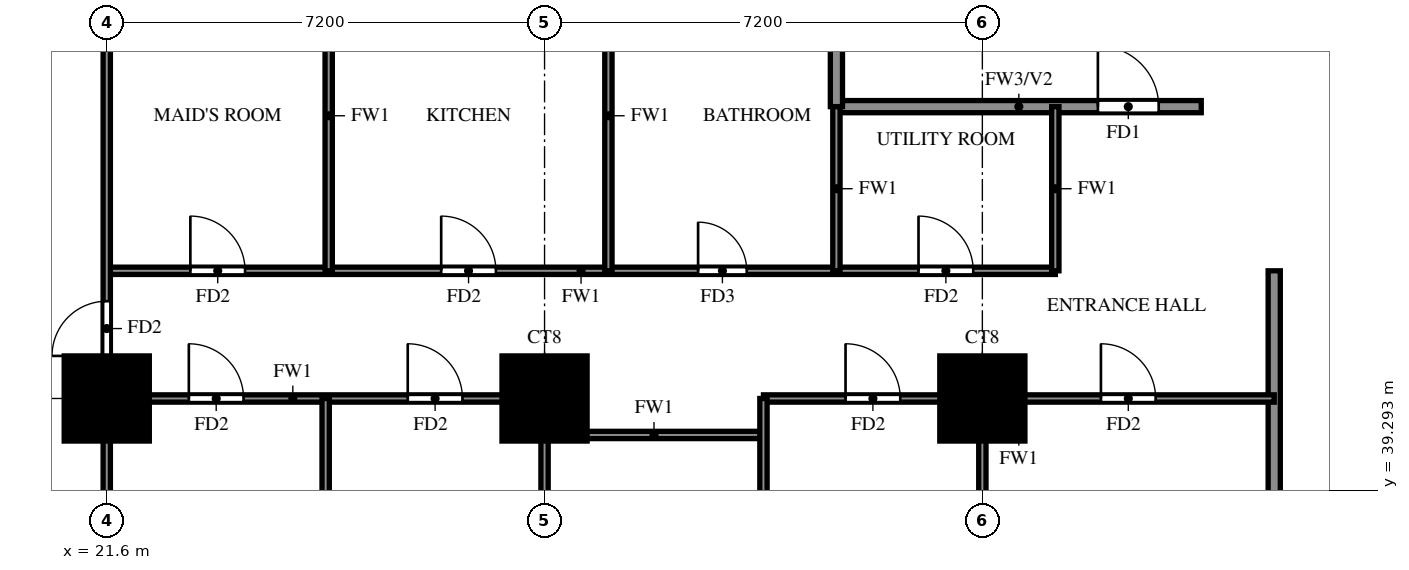
"""IFC4 building model, lengths in metres.
Left out: names, types, materials, properties, quantities, classifications, styles, units other than length and angle.
Written with IfcOpenShell. Run it as: python <this file> out.ifc"""

import sys

from ifc_helpers import new_model, si_unit, direction, frame, frame_2d, origin, origin_2d, place, context, subcontext, project, spatial, rectangle, extrude, source, transform, mapped, element, fill, save


model = new_model("IFC4")
c1 = context("Model", 3, precision=1e-05, world=origin(), true_north=direction((0.0, 1.0)))
c2 = subcontext(c1, "Body", "Model", "MODEL_VIEW")
j1 = project(units=[si_unit("LENGTHUNIT", "METRE"), si_unit("PLANEANGLEUNIT", "RADIAN")], contexts=[c1])
p1 = place(None, origin())
s1 = spatial("IfcSite", under=j1, at=p1, CompositionType="ELEMENT")
p2 = place(p1, origin())
s2 = spatial("IfcBuilding", under=s1, at=p2, CompositionType="ELEMENT")
p3 = place(p2, frame((0.0, 0.0, 30.5)))
s3 = spatial("IfcBuildingStorey", under=s2, at=p3, CompositionType="ELEMENT", Elevation=30.5)
m1 = source(origin(), c2, "Body", "SweptSolid", [
    extrude(rectangle(XDim=1.4, YDim=1.4, at=origin_2d()), origin(), (0.0, 0.0, 1.0), 3.18),
])
for number, where, z_axis, x_axis in (
    (1, (21.6, 40.8, 0.0), (0.0, 0.0, 1.0), (1.0, 0.0, 0.0)),
    (2, (28.8, 40.8, 0.0), (0.0, 0.0, 1.0), (1.0, 0.0, 0.0)),
    (3, (36.0, 40.8, 0.0), (0.0, 0.0, 1.0), (1.0, 0.0, 0.0)),
):
    element("IfcColumn", number, at=place(p3, frame(where, z_axis=z_axis, x_axis=x_axis)), inside=s3, PredefinedType="COLUMN", context=c2, shape_type="MappedRepresentation", body=[
        mapped(m1, transform((0.0, 0.0, 0.0))),
    ])
p4 = place(p3, frame((33.6, 45.6, 0.0), z_axis=(0.0, 0.0, 1.0), x_axis=(1.0, 0.0, 0.0)))
e4 = element("IfcWall", 4, at=p4, inside=s3, PredefinedType="SOLIDWALL", context=c2, shape_type="SweptSolid", body=[
    extrude(rectangle(XDim=6.0, YDim=0.2, at=frame_2d((3.0, 0.0))), origin(), (0.0, 0.0, 1.0), 3.18),
])
p5 = place(p4, frame((4.3, 0.0, 0.0)))
e5 = element("IfcOpeningElement", 5, at=p5, cuts=e4, PredefinedType="OPENING", context=c2, shape_type="SweptSolid", body=[
    extrude(rectangle(XDim=1.0, YDim=2.1, at=frame_2d((0.5, 1.05))), frame((0.0, 0.11, 0.0), z_axis=(0.0, -1.0, 0.0), x_axis=(1.0, 0.0, 0.0)), (0.0, 0.0, 1.0), 0.22),
])
p6 = place(p3, frame((33.6, 45.6, 0.0), z_axis=(0.0, 0.0, 1.0), x_axis=(0.0, 1.0, 0.0)))
e6 = element("IfcWall", 6, at=p6, inside=s3, PredefinedType="SOLIDWALL", context=c2, shape_type="SweptSolid", body=[
    extrude(rectangle(XDim=14.4, YDim=0.2, at=frame_2d((7.2, 0.0))), origin(), (0.0, 0.0, 1.0), 3.18),
])
p7 = place(p3, frame((40.8, 33.725, 0.0), z_axis=(0.0, 0.0, 1.0), x_axis=(0.0, 1.0, 0.0)))
e7 = element("IfcWall", 7, at=p7, inside=s3, PredefinedType="SOLIDWALL", context=c2, shape_type="SweptSolid", body=[
    extrude(rectangle(XDim=9.175, YDim=0.2, at=frame_2d((4.587, 0.0))), origin(), (0.0, 0.0, 1.0), 2.28),
])
p8 = place(p3, frame((28.8, 40.2, 0.0), z_axis=(0.0, 0.0, 1.0), x_axis=(1.0, 0.0, 0.0)))
e8 = element("IfcWall", 8, at=p8, inside=s3, PredefinedType="PARTITIONING", context=c2, shape_type="SweptSolid", body=[
    extrude(rectangle(XDim=3.6, YDim=0.12, at=frame_2d((1.8, 0.0))), origin(), (0.0, 0.0, 1.0), 3.18),
])
p9 = place(p3, frame((21.6, 40.8, 0.0), z_axis=(0.0, 0.0, 1.0), x_axis=(1.0, 0.0, 0.0)))
e9 = element("IfcWall", 9, at=p9, inside=s3, PredefinedType="PARTITIONING", context=c2, shape_type="SweptSolid", body=[
    extrude(rectangle(XDim=7.2, YDim=0.12, at=frame_2d((3.6, 0.0))), origin(), (0.0, 0.0, 1.0), 3.18),
])
p10 = place(p9, frame((1.35, 0.0, 0.0)))
e10 = element("IfcOpeningElement", 10, at=p10, cuts=e9, PredefinedType="OPENING", context=c2, shape_type="SweptSolid", body=[
    extrude(rectangle(XDim=0.9, YDim=2.1, at=frame_2d((0.45, 1.05))), frame((0.0, 0.07, 0.0), z_axis=(0.0, -1.0, 0.0), x_axis=(1.0, 0.0, 0.0)), (0.0, 0.0, 1.0), 0.14),
])
p11 = place(p9, frame((4.95, 0.0, 0.0)))
e11 = element("IfcOpeningElement", 11, at=p11, cuts=e9, PredefinedType="OPENING", context=c2, shape_type="SweptSolid", body=[
    extrude(rectangle(XDim=0.9, YDim=2.1, at=frame_2d((0.45, 1.05))), frame((0.0, 0.07, 0.0), z_axis=(0.0, -1.0, 0.0), x_axis=(1.0, 0.0, 0.0)), (0.0, 0.0, 1.0), 0.14),
])
p12 = place(p3, frame((32.4, 40.8, 0.0), z_axis=(0.0, 0.0, 1.0), x_axis=(1.0, 0.0, 0.0)))
e12 = element("IfcWall", 12, at=p12, inside=s3, PredefinedType="PARTITIONING", context=c2, shape_type="SweptSolid", body=[
    extrude(rectangle(XDim=8.4, YDim=0.12, at=frame_2d((4.2, 0.0))), origin(), (0.0, 0.0, 1.0), 3.18),
])
p13 = place(p12, frame((1.35, 0.0, 0.0)))
e13 = element("IfcOpeningElement", 13, at=p13, cuts=e12, PredefinedType="OPENING", context=c2, shape_type="SweptSolid", body=[
    extrude(rectangle(XDim=0.9, YDim=2.1, at=frame_2d((0.45, 1.05))), frame((0.0, 0.07, 0.0), z_axis=(0.0, -1.0, 0.0), x_axis=(1.0, 0.0, 0.0)), (0.0, 0.0, 1.0), 0.14),
])
p14 = place(p12, frame((5.55, 0.0, 0.0)))
e14 = element("IfcOpeningElement", 14, at=p14, cuts=e12, PredefinedType="OPENING", context=c2, shape_type="SweptSolid", body=[
    extrude(rectangle(XDim=0.9, YDim=2.1, at=frame_2d((0.45, 1.05))), frame((0.0, 0.07, 0.0), z_axis=(0.0, -1.0, 0.0), x_axis=(1.0, 0.0, 0.0)), (0.0, 0.0, 1.0), 0.14),
])
p15 = place(p3, frame((21.6, 42.9, 0.0), z_axis=(0.0, 0.0, 1.0), x_axis=(1.0, 0.0, 0.0)))
e15 = element("IfcWall", 15, at=p15, inside=s3, PredefinedType="PARTITIONING", context=c2, shape_type="SweptSolid", body=[
    extrude(rectangle(XDim=15.6, YDim=0.12, at=frame_2d((7.8, 0.0))), origin(), (0.0, 0.0, 1.0), 3.18),
])
p16 = place(p15, frame((1.375, 0.0, 0.0)))
e16 = element("IfcOpeningElement", 16, at=p16, cuts=e15, PredefinedType="OPENING", context=c2, shape_type="SweptSolid", body=[
    extrude(rectangle(XDim=0.9, YDim=2.1, at=frame_2d((0.45, 1.05))), frame((0.0, 0.07, 0.0), z_axis=(0.0, -1.0, 0.0), x_axis=(1.0, 0.0, 0.0)), (0.0, 0.0, 1.0), 0.14),
])
p17 = place(p15, frame((5.5, 0.0, 0.0)))
e17 = element("IfcOpeningElement", 17, at=p17, cuts=e15, PredefinedType="OPENING", context=c2, shape_type="SweptSolid", body=[
    extrude(rectangle(XDim=0.9, YDim=2.1, at=frame_2d((0.45, 1.05))), frame((0.0, 0.07, 0.0), z_axis=(0.0, -1.0, 0.0), x_axis=(1.0, 0.0, 0.0)), (0.0, 0.0, 1.0), 0.14),
])
p18 = place(p15, frame((9.725, 0.0, 0.0)))
e18 = element("IfcOpeningElement", 18, at=p18, cuts=e15, PredefinedType="OPENING", context=c2, shape_type="SweptSolid", body=[
    extrude(rectangle(XDim=0.8, YDim=2.1, at=frame_2d((0.4, 1.05))), frame((0.0, 0.07, 0.0), z_axis=(0.0, -1.0, 0.0), x_axis=(1.0, 0.0, 0.0)), (0.0, 0.0, 1.0), 0.14),
])
p19 = place(p15, frame((13.35, 0.0, 0.0)))
e19 = element("IfcOpeningElement", 19, at=p19, cuts=e15, PredefinedType="OPENING", context=c2, shape_type="SweptSolid", body=[
    extrude(rectangle(XDim=0.9, YDim=2.1, at=frame_2d((0.45, 1.05))), frame((0.0, 0.07, 0.0), z_axis=(0.0, -1.0, 0.0), x_axis=(1.0, 0.0, 0.0)), (0.0, 0.0, 1.0), 0.14),
])
p20 = place(p3, frame((21.6, 33.725, 0.0), z_axis=(0.0, 0.0, 1.0), x_axis=(0.0, 1.0, 0.0)))
e20 = element("IfcWall", 20, at=p20, inside=s3, PredefinedType="PARTITIONING", context=c2, shape_type="SweptSolid", body=[
    extrude(rectangle(XDim=35.875, YDim=0.12, at=frame_2d((17.938, 0.0))), origin(), (0.0, 0.0, 1.0), 3.18),
])
p21 = place(p20, frame((7.775, 0.0, 0.0)))
e21 = element("IfcOpeningElement", 21, at=p21, cuts=e20, PredefinedType="OPENING", context=c2, shape_type="SweptSolid", body=[
    extrude(rectangle(XDim=0.9, YDim=2.1, at=frame_2d((0.45, 1.05))), frame((0.0, 0.07, 0.0), z_axis=(0.0, -1.0, 0.0), x_axis=(1.0, 0.0, 0.0)), (0.0, 0.0, 1.0), 0.14),
])
p22 = place(p20, frame((15.625, 0.0, 0.0)))
e22 = element("IfcOpeningElement", 22, at=p22, cuts=e20, PredefinedType="OPENING", context=c2, shape_type="SweptSolid", body=[
    extrude(rectangle(XDim=0.9, YDim=2.1, at=frame_2d((0.45, 1.05))), frame((0.0, 0.07, 0.0), z_axis=(0.0, -1.0, 0.0), x_axis=(1.0, 0.0, 0.0)), (0.0, 0.0, 1.0), 0.14),
])
p23 = place(p20, frame((22.225, 0.0, 0.0)))
e23 = element("IfcOpeningElement", 23, at=p23, cuts=e20, PredefinedType="OPENING", context=c2, shape_type="SweptSolid", body=[
    extrude(rectangle(XDim=1.5, YDim=2.1, at=frame_2d((0.75, 1.05))), frame((0.0, 0.07, 0.0), z_axis=(0.0, -1.0, 0.0), x_axis=(1.0, 0.0, 0.0)), (0.0, 0.0, 1.0), 0.14),
])
p24 = place(p20, frame((26.425, 0.0, 0.0)))
e24 = element("IfcOpeningElement", 24, at=p24, cuts=e20, PredefinedType="OPENING", context=c2, shape_type="SweptSolid", body=[
    extrude(rectangle(XDim=0.9, YDim=2.1, at=frame_2d((0.45, 1.05))), frame((0.0, 0.07, 0.0), z_axis=(0.0, -1.0, 0.0), x_axis=(1.0, 0.0, 0.0)), (0.0, 0.0, 1.0), 0.14),
])
p25 = place(p20, frame((30.025, 0.0, 0.0)))
e25 = element("IfcOpeningElement", 25, at=p25, cuts=e20, PredefinedType="OPENING", context=c2, shape_type="SweptSolid", body=[
    extrude(rectangle(XDim=0.9, YDim=2.1, at=frame_2d((0.45, 1.05))), frame((0.0, 0.07, 0.0), z_axis=(0.0, -1.0, 0.0), x_axis=(1.0, 0.0, 0.0)), (0.0, 0.0, 1.0), 0.14),
])
p26 = place(p20, frame((33.625, 0.0, 0.0)))
e26 = element("IfcOpeningElement", 26, at=p26, cuts=e20, PredefinedType="OPENING", context=c2, shape_type="SweptSolid", body=[
    extrude(rectangle(XDim=0.9, YDim=2.1, at=frame_2d((0.45, 1.05))), frame((0.0, 0.07, 0.0), z_axis=(0.0, -1.0, 0.0), x_axis=(1.0, 0.0, 0.0)), (0.0, 0.0, 1.0), 0.14),
])
p27 = place(p3, frame((25.2, 33.725, 0.0), z_axis=(0.0, 0.0, 1.0), x_axis=(0.0, 1.0, 0.0)))
e27 = element("IfcWall", 27, at=p27, inside=s3, PredefinedType="PARTITIONING", context=c2, shape_type="SweptSolid", body=[
    extrude(rectangle(XDim=7.075, YDim=0.12, at=frame_2d((3.538, 0.0))), origin(), (0.0, 0.0, 1.0), 2.28),
])
p28 = place(p3, frame((25.25, 42.9, 0.0), z_axis=(0.0, 0.0, 1.0), x_axis=(0.0, 1.0, 0.0)))
e28 = element("IfcWall", 28, at=p28, inside=s3, PredefinedType="PARTITIONING", context=c2, shape_type="SweptSolid", body=[
    extrude(rectangle(XDim=5.1, YDim=0.12, at=frame_2d((2.55, 0.0))), origin(), (0.0, 0.0, 1.0), 3.18),
])
p29 = place(p3, frame((28.8, 33.725, 0.0), z_axis=(0.0, 0.0, 1.0), x_axis=(0.0, 1.0, 0.0)))
e29 = element("IfcWall", 29, at=p29, inside=s3, PredefinedType="PARTITIONING", context=c2, shape_type="SweptSolid", body=[
    extrude(rectangle(XDim=7.075, YDim=0.12, at=frame_2d((3.538, 0.0))), origin(), (0.0, 0.0, 1.0), 3.18),
])
p30 = place(p29, frame((2.837, 0.0, 0.0)))
e30 = element("IfcOpeningElement", 30, at=p30, cuts=e29, PredefinedType="OPENING", context=c2, shape_type="SweptSolid", body=[
    extrude(rectangle(XDim=0.8, YDim=2.1, at=frame_2d((0.4, 1.05))), frame((0.0, 0.07, 0.0), z_axis=(0.0, -1.0, 0.0), x_axis=(1.0, 0.0, 0.0)), (0.0, 0.0, 1.0), 0.14),
])
p31 = place(p3, frame((29.85, 42.9, 0.0), z_axis=(0.0, 0.0, 1.0), x_axis=(0.0, 1.0, 0.0)))
e31 = element("IfcWall", 31, at=p31, inside=s3, PredefinedType="PARTITIONING", context=c2, shape_type="SweptSolid", body=[
    extrude(rectangle(XDim=5.1, YDim=0.12, at=frame_2d((2.55, 0.0))), origin(), (0.0, 0.0, 1.0), 3.18),
])
p32 = place(p3, frame((32.4, 33.725, 0.0), z_axis=(0.0, 0.0, 1.0), x_axis=(0.0, 1.0, 0.0)))
e32 = element("IfcWall", 32, at=p32, inside=s3, PredefinedType="PARTITIONING", context=c2, shape_type="SweptSolid", body=[
    extrude(rectangle(XDim=7.075, YDim=0.12, at=frame_2d((3.538, 0.0))), origin(), (0.0, 0.0, 1.0), 2.28),
])
p33 = place(p3, frame((33.6, 42.9, 0.0), z_axis=(0.0, 0.0, 1.0), x_axis=(0.0, 1.0, 0.0)))
e33 = element("IfcWall", 33, at=p33, inside=s3, PredefinedType="PARTITIONING", context=c2, shape_type="SweptSolid", body=[
    extrude(rectangle(XDim=2.7, YDim=0.12, at=frame_2d((1.35, 0.0))), origin(), (0.0, 0.0, 1.0), 3.18),
])
p34 = place(p3, frame((36.0, 33.725, 0.0), z_axis=(0.0, 0.0, 1.0), x_axis=(0.0, 1.0, 0.0)))
e34 = element("IfcWall", 34, at=p34, inside=s3, PredefinedType="PARTITIONING", context=c2, shape_type="SweptSolid", body=[
    extrude(rectangle(XDim=7.075, YDim=0.12, at=frame_2d((3.538, 0.0))), origin(), (0.0, 0.0, 1.0), 3.18),
])
p35 = place(p3, frame((37.2, 42.9, 0.0), z_axis=(0.0, 0.0, 1.0), x_axis=(0.0, 1.0, 0.0)))
e35 = element("IfcWall", 35, at=p35, inside=s3, PredefinedType="PARTITIONING", context=c2, shape_type="SweptSolid", body=[
    extrude(rectangle(XDim=2.7, YDim=0.12, at=frame_2d((1.35, 0.0))), origin(), (0.0, 0.0, 1.0), 3.18),
])
p36 = place(p5, origin())
e36 = element("IfcDoor", 36, at=p36, inside=s3, OperationType="SINGLE_SWING_RIGHT", PredefinedType="DOOR", context=c2, shape_type="SweptSolid", body=[
    extrude(rectangle(XDim=1.0, YDim=2.1, at=frame_2d((0.5, 1.05))), frame((0.0, 0.025, 0.0), z_axis=(0.0, -1.0, 0.0), x_axis=(1.0, 0.0, 0.0)), (0.0, 0.0, 1.0), 0.05),
])
fill(e5, e36)
p37 = place(p21, origin())
e37 = element("IfcDoor", 37, at=p37, inside=s3, OperationType="SINGLE_SWING_RIGHT", PredefinedType="DOOR", context=c2, shape_type="SweptSolid", body=[
    extrude(rectangle(XDim=0.9, YDim=2.1, at=frame_2d((0.45, 1.05))), frame((0.0, 0.025, 0.0), z_axis=(0.0, -1.0, 0.0), x_axis=(1.0, 0.0, 0.0)), (0.0, 0.0, 1.0), 0.05),
])
fill(e21, e37)
p38 = place(p10, origin())
e38 = element("IfcDoor", 38, at=p38, inside=s3, OperationType="SINGLE_SWING_LEFT", PredefinedType="DOOR", context=c2, shape_type="SweptSolid", body=[
    extrude(rectangle(XDim=0.9, YDim=2.1, at=frame_2d((0.45, 1.05))), frame((0.0, 0.025, 0.0), z_axis=(0.0, -1.0, 0.0), x_axis=(1.0, 0.0, 0.0)), (0.0, 0.0, 1.0), 0.05),
])
fill(e10, e38)
p39 = place(p11, origin())
e39 = element("IfcDoor", 39, at=p39, inside=s3, OperationType="SINGLE_SWING_RIGHT", PredefinedType="DOOR", context=c2, shape_type="SweptSolid", body=[
    extrude(rectangle(XDim=0.9, YDim=2.1, at=frame_2d((0.45, 1.05))), frame((0.0, 0.025, 0.0), z_axis=(0.0, -1.0, 0.0), x_axis=(1.0, 0.0, 0.0)), (0.0, 0.0, 1.0), 0.05),
])
fill(e11, e39)
p40 = place(p13, origin())
e40 = element("IfcDoor", 40, at=p40, inside=s3, OperationType="SINGLE_SWING_LEFT", PredefinedType="DOOR", context=c2, shape_type="SweptSolid", body=[
    extrude(rectangle(XDim=0.9, YDim=2.1, at=frame_2d((0.45, 1.05))), frame((0.0, 0.025, 0.0), z_axis=(0.0, -1.0, 0.0), x_axis=(1.0, 0.0, 0.0)), (0.0, 0.0, 1.0), 0.05),
])
fill(e13, e40)
p41 = place(p14, origin())
e41 = element("IfcDoor", 41, at=p41, inside=s3, OperationType="SINGLE_SWING_RIGHT", PredefinedType="DOOR", context=c2, shape_type="SweptSolid", body=[
    extrude(rectangle(XDim=0.9, YDim=2.1, at=frame_2d((0.45, 1.05))), frame((0.0, 0.025, 0.0), z_axis=(0.0, -1.0, 0.0), x_axis=(1.0, 0.0, 0.0)), (0.0, 0.0, 1.0), 0.05),
])
fill(e14, e41)
p42 = place(p16, origin())
e42 = element("IfcDoor", 42, at=p42, inside=s3, OperationType="SINGLE_SWING_LEFT", PredefinedType="DOOR", context=c2, shape_type="SweptSolid", body=[
    extrude(rectangle(XDim=0.9, YDim=2.1, at=frame_2d((0.45, 1.05))), frame((0.0, 0.025, 0.0), z_axis=(0.0, -1.0, 0.0), x_axis=(1.0, 0.0, 0.0)), (0.0, 0.0, 1.0), 0.05),
])
fill(e16, e42)
p43 = place(p17, origin())
e43 = element("IfcDoor", 43, at=p43, inside=s3, OperationType="SINGLE_SWING_LEFT", PredefinedType="DOOR", context=c2, shape_type="SweptSolid", body=[
    extrude(rectangle(XDim=0.9, YDim=2.1, at=frame_2d((0.45, 1.05))), frame((0.0, 0.025, 0.0), z_axis=(0.0, -1.0, 0.0), x_axis=(1.0, 0.0, 0.0)), (0.0, 0.0, 1.0), 0.05),
])
fill(e17, e43)
p44 = place(p18, origin())
e44 = element("IfcDoor", 44, at=p44, inside=s3, OperationType="SINGLE_SWING_RIGHT", PredefinedType="DOOR", context=c2, shape_type="SweptSolid", body=[
    extrude(rectangle(XDim=0.8, YDim=2.1, at=frame_2d((0.4, 1.05))), frame((0.0, 0.025, 0.0), z_axis=(0.0, -1.0, 0.0), x_axis=(1.0, 0.0, 0.0)), (0.0, 0.0, 1.0), 0.05),
])
fill(e18, e44)
p45 = place(p19, origin())
e45 = element("IfcDoor", 45, at=p45, inside=s3, OperationType="SINGLE_SWING_LEFT", PredefinedType="DOOR", context=c2, shape_type="SweptSolid", body=[
    extrude(rectangle(XDim=0.9, YDim=2.1, at=frame_2d((0.45, 1.05))), frame((0.0, 0.025, 0.0), z_axis=(0.0, -1.0, 0.0), x_axis=(1.0, 0.0, 0.0)), (0.0, 0.0, 1.0), 0.05),
])
fill(e19, e45)
save(model, sys.argv[1])
